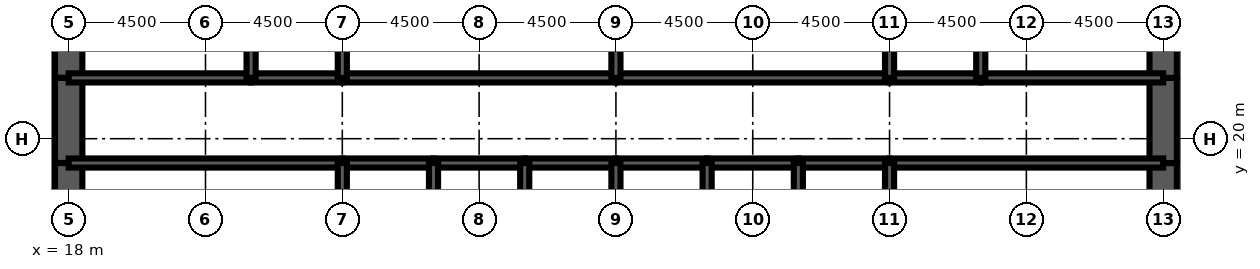
"""IFC4 building model, lengths in metres.
Left out: names, types, materials, properties, quantities, classifications, styles, units other than length and angle.
Written with IfcOpenShell. Run it as: python <this file> out.ifc"""

import sys

from ifc_helpers import new_model, si_unit, direction, frame, frame_2d, origin, place, context, subcontext, project, spatial, rectangle, extrude, element, fill, save


model = new_model("IFC4")
c1 = context("Model", 3, precision=1e-05, world=origin(), true_north=direction((0.0, 1.0)))
c2 = subcontext(c1, "Body", "Model", "MODEL_VIEW")
j1 = project(units=[si_unit("LENGTHUNIT", "METRE"), si_unit("PLANEANGLEUNIT", "RADIAN")], contexts=[c1])
p1 = place(None, origin())
s1 = spatial("IfcSite", under=j1, at=p1, CompositionType="ELEMENT")
p2 = place(p1, origin())
s2 = spatial("IfcBuilding", under=s1, at=p2, CompositionType="ELEMENT")
p3 = place(p2, frame((0.0, 0.0, 77.0)))
s3 = spatial("IfcBuildingStorey", under=s2, at=p3, CompositionType="ELEMENT", Elevation=77.0)
p4 = place(p3, frame((18.0, 26.0, 0.0), z_axis=(0.0, 0.0, 1.0), x_axis=(0.0, -1.0, 0.0)))
e1 = element("IfcWall", 1, at=p4, inside=s3, PredefinedType="SHEAR", context=c2, shape_type="SweptSolid", body=[
    extrude(rectangle(XDim=4.0, YDim=0.9, at=frame_2d((2.0, 0.0))), origin(), (0.0, 0.0, 1.0), 4.5),
])
p5 = place(p3, frame((18.0, 22.0, 0.0), z_axis=(0.0, 0.0, 1.0), x_axis=(0.0, -1.0, 0.0)))
e2 = element("IfcWall", 2, at=p5, inside=s3, PredefinedType="SHEAR", context=c2, shape_type="SweptSolid", body=[
    extrude(rectangle(XDim=2.8, YDim=0.9, at=frame_2d((1.4, 0.0))), origin(), (0.0, 0.0, 1.0), 4.5),
])
p6 = place(p5, frame((0.6, 0.0, 0.0)))
e3 = element("IfcOpeningElement", 3, at=p6, cuts=e2, PredefinedType="OPENING", context=c2, shape_type="SweptSolid", body=[
    extrude(rectangle(XDim=1.8, YDim=2.1, at=frame_2d((0.9, 1.05))), frame((0.0, 0.46, 0.0), z_axis=(0.0, -1.0, 0.0), x_axis=(1.0, 0.0, 0.0)), (0.0, 0.0, 1.0), 0.92),
])
for number, where, z_axis, x_axis in (
    (4, (18.0, 19.2, 0.0), (0.0, 0.0, 1.0), (0.0, -1.0, 0.0)),
    (5, (54.0, 16.0, 0.0), (0.0, 0.0, 1.0), (0.0, 1.0, 0.0)),
):
    element("IfcWall", number, at=place(p3, frame(where, z_axis=z_axis, x_axis=x_axis)), inside=s3, PredefinedType="SHEAR", context=c2, shape_type="SweptSolid", body=[
        extrude(rectangle(XDim=3.2, YDim=0.9, at=frame_2d((1.6, 0.0))), origin(), (0.0, 0.0, 1.0), 4.5),
    ])
p7 = place(p3, frame((54.0, 19.2, 0.0), z_axis=(0.0, 0.0, 1.0), x_axis=(0.0, 1.0, 0.0)))
e6 = element("IfcWall", 6, at=p7, inside=s3, PredefinedType="SHEAR", context=c2, shape_type="SweptSolid", body=[
    extrude(rectangle(XDim=2.8, YDim=0.9, at=frame_2d((1.4, 0.0))), origin(), (0.0, 0.0, 1.0), 4.5),
])
p8 = place(p7, frame((0.4, 0.0, 0.0)))
e7 = element("IfcOpeningElement", 7, at=p8, cuts=e6, PredefinedType="OPENING", context=c2, shape_type="SweptSolid", body=[
    extrude(rectangle(XDim=1.8, YDim=2.1, at=frame_2d((0.9, 1.05))), frame((0.0, 0.46, 0.0), z_axis=(0.0, -1.0, 0.0), x_axis=(1.0, 0.0, 0.0)), (0.0, 0.0, 1.0), 0.92),
])
p9 = place(p3, frame((54.0, 22.0, 0.0), z_axis=(0.0, 0.0, 1.0), x_axis=(0.0, 1.0, 0.0)))
e8 = element("IfcWall", 8, at=p9, inside=s3, PredefinedType="SHEAR", context=c2, shape_type="SweptSolid", body=[
    extrude(rectangle(XDim=4.0, YDim=0.9, at=frame_2d((2.0, 0.0))), origin(), (0.0, 0.0, 1.0), 4.5),
])
p10 = place(p3, frame((18.0, 19.2, 0.0), z_axis=(0.0, 0.0, 1.0), x_axis=(1.0, 0.0, 0.0)))
e9 = element("IfcWall", 9, at=p10, inside=s3, PredefinedType="SOLIDWALL", context=c2, shape_type="SweptSolid", body=[
    extrude(rectangle(XDim=9.0, YDim=0.3, at=frame_2d((4.5, 0.0))), origin(), (0.0, 0.0, 1.0), 4.5),
])
p11 = place(p10, frame((0.65, 0.0, 0.0)))
e10 = element("IfcOpeningElement", 10, at=p11, cuts=e9, PredefinedType="OPENING", context=c2, shape_type="SweptSolid", body=[
    extrude(rectangle(XDim=1.0, YDim=2.1, at=frame_2d((0.5, 1.05))), frame((0.0, 0.16, 0.0), z_axis=(0.0, -1.0, 0.0), x_axis=(1.0, 0.0, 0.0)), (0.0, 0.0, 1.0), 0.32),
])
p12 = place(p3, frame((27.0, 19.2, 0.0), z_axis=(0.0, 0.0, 1.0), x_axis=(1.0, 0.0, 0.0)))
e11 = element("IfcWall", 11, at=p12, inside=s3, PredefinedType="SOLIDWALL", context=c2, shape_type="SweptSolid", body=[
    extrude(rectangle(XDim=3.0, YDim=0.3, at=frame_2d((1.5, 0.0))), origin(), (0.0, 0.0, 1.0), 4.5),
])
p13 = place(p12, frame((0.95, 0.0, 0.0)))
e12 = element("IfcOpeningElement", 12, at=p13, cuts=e11, PredefinedType="OPENING", context=c2, shape_type="SweptSolid", body=[
    extrude(rectangle(XDim=1.1, YDim=2.2, at=frame_2d((0.55, 1.1))), frame((0.0, 0.16, 0.0), z_axis=(0.0, -1.0, 0.0), x_axis=(1.0, 0.0, 0.0)), (0.0, 0.0, 1.0), 0.32),
])
p14 = place(p3, frame((30.0, 19.2, 0.0), z_axis=(0.0, 0.0, 1.0), x_axis=(1.0, 0.0, 0.0)))
e13 = element("IfcWall", 13, at=p14, inside=s3, PredefinedType="SOLIDWALL", context=c2, shape_type="SweptSolid", body=[
    extrude(rectangle(XDim=3.0, YDim=0.3, at=frame_2d((1.5, 0.0))), origin(), (0.0, 0.0, 1.0), 4.5),
])
p15 = place(p14, frame((0.95, 0.0, 0.0)))
e14 = element("IfcOpeningElement", 14, at=p15, cuts=e13, PredefinedType="OPENING", context=c2, shape_type="SweptSolid", body=[
    extrude(rectangle(XDim=1.1, YDim=2.2, at=frame_2d((0.55, 1.1))), frame((0.0, 0.16, 0.0), z_axis=(0.0, -1.0, 0.0), x_axis=(1.0, 0.0, 0.0)), (0.0, 0.0, 1.0), 0.32),
])
p16 = place(p3, frame((33.0, 19.2, 0.0), z_axis=(0.0, 0.0, 1.0), x_axis=(1.0, 0.0, 0.0)))
e15 = element("IfcWall", 15, at=p16, inside=s3, PredefinedType="SOLIDWALL", context=c2, shape_type="SweptSolid", body=[
    extrude(rectangle(XDim=3.0, YDim=0.3, at=frame_2d((1.5, 0.0))), origin(), (0.0, 0.0, 1.0), 4.5),
])
p17 = place(p16, frame((0.95, 0.0, 0.0)))
e16 = element("IfcOpeningElement", 16, at=p17, cuts=e15, PredefinedType="OPENING", context=c2, shape_type="SweptSolid", body=[
    extrude(rectangle(XDim=1.1, YDim=2.2, at=frame_2d((0.55, 1.1))), frame((0.0, 0.16, 0.0), z_axis=(0.0, -1.0, 0.0), x_axis=(1.0, 0.0, 0.0)), (0.0, 0.0, 1.0), 0.32),
])
p18 = place(p3, frame((36.0, 19.2, 0.0), z_axis=(0.0, 0.0, 1.0), x_axis=(1.0, 0.0, 0.0)))
e17 = element("IfcWall", 17, at=p18, inside=s3, PredefinedType="SOLIDWALL", context=c2, shape_type="SweptSolid", body=[
    extrude(rectangle(XDim=3.0, YDim=0.3, at=frame_2d((1.5, 0.0))), origin(), (0.0, 0.0, 1.0), 4.5),
])
p19 = place(p18, frame((0.95, 0.0, 0.0)))
e18 = element("IfcOpeningElement", 18, at=p19, cuts=e17, PredefinedType="OPENING", context=c2, shape_type="SweptSolid", body=[
    extrude(rectangle(XDim=1.1, YDim=2.2, at=frame_2d((0.55, 1.1))), frame((0.0, 0.16, 0.0), z_axis=(0.0, -1.0, 0.0), x_axis=(1.0, 0.0, 0.0)), (0.0, 0.0, 1.0), 0.32),
])
for number, where, z_axis, x_axis in (
    (19, (39.0, 19.2, 0.0), (0.0, 0.0, 1.0), (1.0, 0.0, 0.0)),
    (20, (42.0, 19.2, 0.0), (0.0, 0.0, 1.0), (1.0, 0.0, 0.0)),
):
    element("IfcWall", number, at=place(p3, frame(where, z_axis=z_axis, x_axis=x_axis)), inside=s3, PredefinedType="SOLIDWALL", context=c2, shape_type="SweptSolid", body=[
        extrude(rectangle(XDim=3.0, YDim=0.3, at=frame_2d((1.5, 0.0))), origin(), (0.0, 0.0, 1.0), 4.5),
    ])
p20 = place(p3, frame((45.0, 19.2, 0.0), z_axis=(0.0, 0.0, 1.0), x_axis=(1.0, 0.0, 0.0)))
e21 = element("IfcWall", 21, at=p20, inside=s3, PredefinedType="SOLIDWALL", context=c2, shape_type="SweptSolid", body=[
    extrude(rectangle(XDim=9.0, YDim=0.3, at=frame_2d((4.5, 0.0))), origin(), (0.0, 0.0, 1.0), 4.5),
])
p21 = place(p20, frame((7.35, 0.0, 0.0)))
e22 = element("IfcOpeningElement", 22, at=p21, cuts=e21, PredefinedType="OPENING", context=c2, shape_type="SweptSolid", body=[
    extrude(rectangle(XDim=1.0, YDim=2.1, at=frame_2d((0.5, 1.05))), frame((0.0, 0.16, 0.0), z_axis=(0.0, -1.0, 0.0), x_axis=(1.0, 0.0, 0.0)), (0.0, 0.0, 1.0), 0.32),
])
p22 = place(p3, frame((18.0, 22.0, 0.0), z_axis=(0.0, 0.0, 1.0), x_axis=(1.0, 0.0, 0.0)))
e23 = element("IfcWall", 23, at=p22, inside=s3, PredefinedType="SOLIDWALL", context=c2, shape_type="SweptSolid", body=[
    extrude(rectangle(XDim=6.0, YDim=0.3, at=frame_2d((3.0, 0.0))), origin(), (0.0, 0.0, 1.0), 4.5),
])
p23 = place(p22, frame((2.0, 0.0, 0.0)))
e24 = element("IfcOpeningElement", 24, at=p23, cuts=e23, PredefinedType="OPENING", context=c2, shape_type="SweptSolid", body=[
    extrude(rectangle(XDim=1.0, YDim=2.1, at=frame_2d((0.5, 1.05))), frame((0.0, 0.16, 0.0), z_axis=(0.0, -1.0, 0.0), x_axis=(1.0, 0.0, 0.0)), (0.0, 0.0, 1.0), 0.32),
])
p24 = place(p3, frame((24.0, 22.0, 0.0), z_axis=(0.0, 0.0, 1.0), x_axis=(1.0, 0.0, 0.0)))
e25 = element("IfcWall", 25, at=p24, inside=s3, PredefinedType="SOLIDWALL", context=c2, shape_type="SweptSolid", body=[
    extrude(rectangle(XDim=3.0, YDim=0.3, at=frame_2d((1.5, 0.0))), origin(), (0.0, 0.0, 1.0), 4.5),
])
p25 = place(p24, frame((1.0, 0.0, 0.0)))
e26 = element("IfcOpeningElement", 26, at=p25, cuts=e25, PredefinedType="OPENING", context=c2, shape_type="SweptSolid", body=[
    extrude(rectangle(XDim=1.0, YDim=2.1, at=frame_2d((0.5, 1.05))), frame((0.0, 0.16, 0.0), z_axis=(0.0, -1.0, 0.0), x_axis=(1.0, 0.0, 0.0)), (0.0, 0.0, 1.0), 0.32),
])
p26 = place(p3, frame((27.0, 22.0, 0.0), z_axis=(0.0, 0.0, 1.0), x_axis=(1.0, 0.0, 0.0)))
e27 = element("IfcWall", 27, at=p26, inside=s3, PredefinedType="SOLIDWALL", context=c2, shape_type="SweptSolid", body=[
    extrude(rectangle(XDim=9.0, YDim=0.3, at=frame_2d((4.5, 0.0))), origin(), (0.0, 0.0, 1.0), 4.5),
])
p27 = place(p26, frame((4.0, 0.0, 0.0)))
e28 = element("IfcOpeningElement", 28, at=p27, cuts=e27, PredefinedType="OPENING", context=c2, shape_type="SweptSolid", body=[
    extrude(rectangle(XDim=1.0, YDim=2.1, at=frame_2d((0.5, 1.05))), frame((0.0, 0.16, 0.0), z_axis=(0.0, -1.0, 0.0), x_axis=(1.0, 0.0, 0.0)), (0.0, 0.0, 1.0), 0.32),
])
p28 = place(p3, frame((36.0, 22.0, 0.0), z_axis=(0.0, 0.0, 1.0), x_axis=(1.0, 0.0, 0.0)))
e29 = element("IfcWall", 29, at=p28, inside=s3, PredefinedType="SOLIDWALL", context=c2, shape_type="SweptSolid", body=[
    extrude(rectangle(XDim=9.0, YDim=0.3, at=frame_2d((4.5, 0.0))), origin(), (0.0, 0.0, 1.0), 4.5),
])
p29 = place(p28, frame((4.0, 0.0, 0.0)))
e30 = element("IfcOpeningElement", 30, at=p29, cuts=e29, PredefinedType="OPENING", context=c2, shape_type="SweptSolid", body=[
    extrude(rectangle(XDim=1.0, YDim=2.1, at=frame_2d((0.5, 1.05))), frame((0.0, 0.16, 0.0), z_axis=(0.0, -1.0, 0.0), x_axis=(1.0, 0.0, 0.0)), (0.0, 0.0, 1.0), 0.32),
])
p30 = place(p3, frame((45.0, 22.0, 0.0), z_axis=(0.0, 0.0, 1.0), x_axis=(1.0, 0.0, 0.0)))
e31 = element("IfcWall", 31, at=p30, inside=s3, PredefinedType="SOLIDWALL", context=c2, shape_type="SweptSolid", body=[
    extrude(rectangle(XDim=3.0, YDim=0.3, at=frame_2d((1.5, 0.0))), origin(), (0.0, 0.0, 1.0), 4.5),
])
p31 = place(p30, frame((1.0, 0.0, 0.0)))
e32 = element("IfcOpeningElement", 32, at=p31, cuts=e31, PredefinedType="OPENING", context=c2, shape_type="SweptSolid", body=[
    extrude(rectangle(XDim=1.0, YDim=2.1, at=frame_2d((0.5, 1.05))), frame((0.0, 0.16, 0.0), z_axis=(0.0, -1.0, 0.0), x_axis=(1.0, 0.0, 0.0)), (0.0, 0.0, 1.0), 0.32),
])
p32 = place(p3, frame((48.0, 22.0, 0.0), z_axis=(0.0, 0.0, 1.0), x_axis=(1.0, 0.0, 0.0)))
e33 = element("IfcWall", 33, at=p32, inside=s3, PredefinedType="SOLIDWALL", context=c2, shape_type="SweptSolid", body=[
    extrude(rectangle(XDim=6.0, YDim=0.3, at=frame_2d((3.0, 0.0))), origin(), (0.0, 0.0, 1.0), 4.5),
])
p33 = place(p32, frame((2.0, 0.0, 0.0)))
e34 = element("IfcOpeningElement", 34, at=p33, cuts=e33, PredefinedType="OPENING", context=c2, shape_type="SweptSolid", body=[
    extrude(rectangle(XDim=1.0, YDim=2.1, at=frame_2d((0.5, 1.05))), frame((0.0, 0.16, 0.0), z_axis=(0.0, -1.0, 0.0), x_axis=(1.0, 0.0, 0.0)), (0.0, 0.0, 1.0), 0.32),
])
p34 = place(p32, frame((4.3, 0.0, 0.0)))
e35 = element("IfcOpeningElement", 35, at=p34, cuts=e33, PredefinedType="OPENING", context=c2, shape_type="SweptSolid", body=[
    extrude(rectangle(XDim=1.0, YDim=2.1, at=frame_2d((0.5, 1.05))), frame((0.0, 0.16, 0.0), z_axis=(0.0, -1.0, 0.0), x_axis=(1.0, 0.0, 0.0)), (0.0, 0.0, 1.0), 0.32),
])
for number, where, z_axis, x_axis in (
    (36, (27.0, 16.0, 0.0), (0.0, 0.0, 1.0), (0.0, 1.0, 0.0)),
    (37, (30.0, 16.0, 0.0), (0.0, 0.0, 1.0), (0.0, 1.0, 0.0)),
    (38, (33.0, 16.0, 0.0), (0.0, 0.0, 1.0), (0.0, 1.0, 0.0)),
    (39, (36.0, 16.0, 0.0), (0.0, 0.0, 1.0), (0.0, 1.0, 0.0)),
    (40, (39.0, 16.0, 0.0), (0.0, 0.0, 1.0), (0.0, 1.0, 0.0)),
    (41, (42.0, 16.0, 0.0), (0.0, 0.0, 1.0), (0.0, 1.0, 0.0)),
    (42, (45.0, 16.0, 0.0), (0.0, 0.0, 1.0), (0.0, 1.0, 0.0)),
):
    element("IfcWall", number, at=place(p3, frame(where, z_axis=z_axis, x_axis=x_axis)), inside=s3, PredefinedType="SOLIDWALL", context=c2, shape_type="SweptSolid", body=[
        extrude(rectangle(XDim=3.2, YDim=0.3, at=frame_2d((1.6, 0.0))), origin(), (0.0, 0.0, 1.0), 4.5),
    ])
for number, where, z_axis, x_axis in (
    (43, (24.0, 22.0, 0.0), (0.0, 0.0, 1.0), (0.0, 1.0, 0.0)),
    (44, (27.0, 22.0, 0.0), (0.0, 0.0, 1.0), (0.0, 1.0, 0.0)),
    (45, (36.0, 22.0, 0.0), (0.0, 0.0, 1.0), (0.0, 1.0, 0.0)),
    (46, (45.0, 22.0, 0.0), (0.0, 0.0, 1.0), (0.0, 1.0, 0.0)),
    (47, (48.0, 22.0, 0.0), (0.0, 0.0, 1.0), (0.0, 1.0, 0.0)),
):
    element("IfcWall", number, at=place(p3, frame(where, z_axis=z_axis, x_axis=x_axis)), inside=s3, PredefinedType="SOLIDWALL", context=c2, shape_type="SweptSolid", body=[
        extrude(rectangle(XDim=4.0, YDim=0.3, at=frame_2d((2.0, 0.0))), origin(), (0.0, 0.0, 1.0), 4.5),
    ])
p35 = place(p3, frame((38.0, 22.15, 0.0), z_axis=(0.0, 0.0, 1.0), x_axis=(0.0, 1.0, 0.0)))
e48 = element("IfcWall", 48, at=p35, inside=s3, PredefinedType="PARTITIONING", context=c2, shape_type="SweptSolid", body=[
    extrude(rectangle(XDim=3.7, YDim=0.15, at=frame_2d((1.85, 0.0))), origin(), (0.0, 0.0, 1.0), 3.0),
])
p36 = place(p35, frame((2.2, 0.0, 0.0)))
e49 = element("IfcOpeningElement", 49, at=p36, cuts=e48, PredefinedType="OPENING", context=c2, shape_type="SweptSolid", body=[
    extrude(rectangle(XDim=1.0, YDim=2.1, at=frame_2d((0.5, 1.05))), frame((0.0, 0.085, 0.0), z_axis=(0.0, -1.0, 0.0), x_axis=(1.0, 0.0, 0.0)), (0.0, 0.0, 1.0), 0.17),
])
p37 = place(p3, frame((51.975, 22.15, 0.0), z_axis=(0.0, 0.0, 1.0), x_axis=(0.0, 1.0, 0.0)))
e50 = element("IfcWall", 50, at=p37, inside=s3, PredefinedType="PARTITIONING", context=c2, shape_type="SweptSolid", body=[
    extrude(rectangle(XDim=3.7, YDim=0.15, at=frame_2d((1.85, 0.0))), origin(), (0.0, 0.0, 1.0), 3.0),
])
p38 = place(p13, origin())
e51 = element("IfcDoor", 51, at=p38, inside=s3, OperationType="DOUBLE_DOOR_SLIDING", PredefinedType="USERDEFINED", context=c2, shape_type="SweptSolid", body=[
    extrude(rectangle(XDim=1.1, YDim=2.2, at=frame_2d((0.55, 1.1))), frame((0.0, 0.025, 0.0), z_axis=(0.0, -1.0, 0.0), x_axis=(1.0, 0.0, 0.0)), (0.0, 0.0, 1.0), 0.05),
])
fill(e12, e51)
p39 = place(p15, origin())
e52 = element("IfcDoor", 52, at=p39, inside=s3, OperationType="DOUBLE_DOOR_SLIDING", PredefinedType="USERDEFINED", context=c2, shape_type="SweptSolid", body=[
    extrude(rectangle(XDim=1.1, YDim=2.2, at=frame_2d((0.55, 1.1))), frame((0.0, 0.025, 0.0), z_axis=(0.0, -1.0, 0.0), x_axis=(1.0, 0.0, 0.0)), (0.0, 0.0, 1.0), 0.05),
])
fill(e14, e52)
p40 = place(p17, origin())
e53 = element("IfcDoor", 53, at=p40, inside=s3, OperationType="DOUBLE_DOOR_SLIDING", PredefinedType="USERDEFINED", context=c2, shape_type="SweptSolid", body=[
    extrude(rectangle(XDim=1.1, YDim=2.2, at=frame_2d((0.55, 1.1))), frame((0.0, 0.025, 0.0), z_axis=(0.0, -1.0, 0.0), x_axis=(1.0, 0.0, 0.0)), (0.0, 0.0, 1.0), 0.05),
])
fill(e16, e53)
p41 = place(p19, origin())
e54 = element("IfcDoor", 54, at=p41, inside=s3, OperationType="DOUBLE_DOOR_SLIDING", PredefinedType="USERDEFINED", context=c2, shape_type="SweptSolid", body=[
    extrude(rectangle(XDim=1.1, YDim=2.2, at=frame_2d((0.55, 1.1))), frame((0.0, 0.025, 0.0), z_axis=(0.0, -1.0, 0.0), x_axis=(1.0, 0.0, 0.0)), (0.0, 0.0, 1.0), 0.05),
])
fill(e18, e54)
p42 = place(p11, origin())
e55 = element("IfcDoor", 55, at=p42, inside=s3, OperationType="SINGLE_SWING_LEFT", PredefinedType="DOOR", context=c2, shape_type="SweptSolid", body=[
    extrude(rectangle(XDim=1.0, YDim=2.1, at=frame_2d((0.5, 1.05))), frame((0.0, 0.025, 0.0), z_axis=(0.0, -1.0, 0.0), x_axis=(1.0, 0.0, 0.0)), (0.0, 0.0, 1.0), 0.05),
])
fill(e10, e55)
p43 = place(p21, origin())
e56 = element("IfcDoor", 56, at=p43, inside=s3, OperationType="SINGLE_SWING_RIGHT", PredefinedType="DOOR", context=c2, shape_type="SweptSolid", body=[
    extrude(rectangle(XDim=1.0, YDim=2.1, at=frame_2d((0.5, 1.05))), frame((0.0, 0.025, 0.0), z_axis=(0.0, -1.0, 0.0), x_axis=(1.0, 0.0, 0.0)), (0.0, 0.0, 1.0), 0.05),
])
fill(e22, e56)
p44 = place(p6, origin())
e57 = element("IfcDoor", 57, at=p44, inside=s3, OperationType="SINGLE_SWING_LEFT", PredefinedType="DOOR", context=c2, shape_type="SweptSolid", body=[
    extrude(rectangle(XDim=1.8, YDim=2.1, at=frame_2d((0.9, 1.05))), frame((0.0, 0.45, 0.0), z_axis=(0.0, -1.0, 0.0), x_axis=(1.0, 0.0, 0.0)), (0.0, 0.0, 1.0), 0.899),
])
fill(e3, e57)
p45 = place(p8, origin())
e58 = element("IfcDoor", 58, at=p45, inside=s3, OperationType="SINGLE_SWING_LEFT", PredefinedType="DOOR", context=c2, shape_type="SweptSolid", body=[
    extrude(rectangle(XDim=1.8, YDim=2.1, at=frame_2d((0.9, 1.05))), frame((0.0, 0.45, 0.0), z_axis=(0.0, -1.0, 0.0), x_axis=(1.0, 0.0, 0.0)), (0.0, 0.0, 1.0), 0.899),
])
fill(e7, e58)
p46 = place(p23, origin())
e59 = element("IfcDoor", 59, at=p46, inside=s3, OperationType="SINGLE_SWING_LEFT", PredefinedType="DOOR", context=c2, shape_type="SweptSolid", body=[
    extrude(rectangle(XDim=1.0, YDim=2.1, at=frame_2d((0.5, 1.05))), frame((0.0, 0.025, 0.0), z_axis=(0.0, -1.0, 0.0), x_axis=(1.0, 0.0, 0.0)), (0.0, 0.0, 1.0), 0.05),
])
fill(e24, e59)
p47 = place(p25, origin())
e60 = element("IfcDoor", 60, at=p47, inside=s3, OperationType="SINGLE_SWING_LEFT", PredefinedType="DOOR", context=c2, shape_type="SweptSolid", body=[
    extrude(rectangle(XDim=1.0, YDim=2.1, at=frame_2d((0.5, 1.05))), frame((0.0, 0.025, 0.0), z_axis=(0.0, -1.0, 0.0), x_axis=(1.0, 0.0, 0.0)), (0.0, 0.0, 1.0), 0.05),
])
fill(e26, e60)
p48 = place(p27, origin())
e61 = element("IfcDoor", 61, at=p48, inside=s3, OperationType="SINGLE_SWING_LEFT", PredefinedType="DOOR", context=c2, shape_type="SweptSolid", body=[
    extrude(rectangle(XDim=1.0, YDim=2.1, at=frame_2d((0.5, 1.05))), frame((0.0, 0.025, 0.0), z_axis=(0.0, -1.0, 0.0), x_axis=(1.0, 0.0, 0.0)), (0.0, 0.0, 1.0), 0.05),
])
fill(e28, e61)
p49 = place(p29, origin())
e62 = element("IfcDoor", 62, at=p49, inside=s3, OperationType="SINGLE_SWING_LEFT", PredefinedType="DOOR", context=c2, shape_type="SweptSolid", body=[
    extrude(rectangle(XDim=1.0, YDim=2.1, at=frame_2d((0.5, 1.05))), frame((0.0, 0.025, 0.0), z_axis=(0.0, -1.0, 0.0), x_axis=(1.0, 0.0, 0.0)), (0.0, 0.0, 1.0), 0.05),
])
fill(e30, e62)
p50 = place(p31, origin())
e63 = element("IfcDoor", 63, at=p50, inside=s3, OperationType="SINGLE_SWING_LEFT", PredefinedType="DOOR", context=c2, shape_type="SweptSolid", body=[
    extrude(rectangle(XDim=1.0, YDim=2.1, at=frame_2d((0.5, 1.05))), frame((0.0, 0.025, 0.0), z_axis=(0.0, -1.0, 0.0), x_axis=(1.0, 0.0, 0.0)), (0.0, 0.0, 1.0), 0.05),
])
fill(e32, e63)
p51 = place(p33, origin())
e64 = element("IfcDoor", 64, at=p51, inside=s3, OperationType="SINGLE_SWING_LEFT", PredefinedType="DOOR", context=c2, shape_type="SweptSolid", body=[
    extrude(rectangle(XDim=1.0, YDim=2.1, at=frame_2d((0.5, 1.05))), frame((0.0, 0.025, 0.0), z_axis=(0.0, -1.0, 0.0), x_axis=(1.0, 0.0, 0.0)), (0.0, 0.0, 1.0), 0.05),
])
fill(e34, e64)
p52 = place(p34, origin())
e65 = element("IfcDoor", 65, at=p52, inside=s3, OperationType="SINGLE_SWING_RIGHT", PredefinedType="DOOR", context=c2, shape_type="SweptSolid", body=[
    extrude(rectangle(XDim=1.0, YDim=2.1, at=frame_2d((0.5, 1.05))), frame((0.0, 0.025, 0.0), z_axis=(0.0, -1.0, 0.0), x_axis=(1.0, 0.0, 0.0)), (0.0, 0.0, 1.0), 0.05),
])
fill(e35, e65)
save(model, sys.argv[1])
